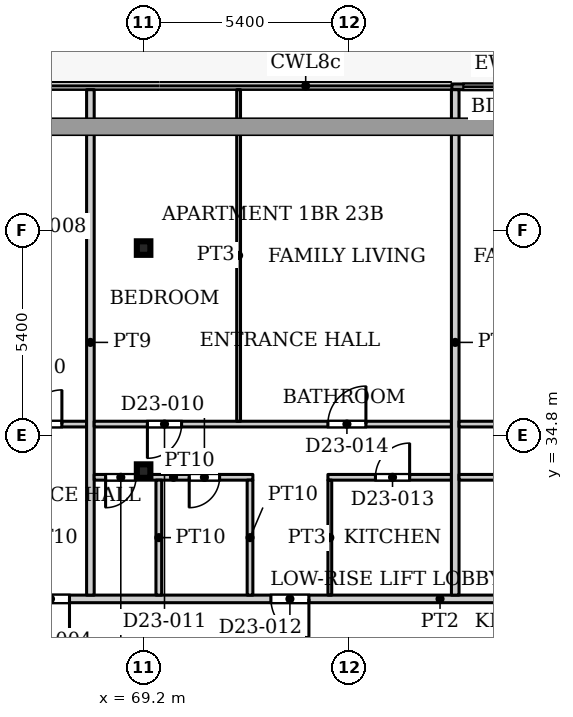
"""IFC4 building model, lengths in metres.
Left out: names, types, materials, properties, quantities, classifications, styles, units other than length and angle.
Written with IfcOpenShell. Run it as: python <this file> out.ifc"""

import sys

from ifc_helpers import new_model, si_unit, direction, frame, frame_2d, origin, origin_2d, place, context, subcontext, project, spatial, rectangle, hollow_rectangle, extrude, source, transform, mapped, element, fill, save


model = new_model("IFC4")
c1 = context("Model", 3, precision=1e-05, world=origin(), true_north=direction((0.0, 1.0)))
c2 = subcontext(c1, "Body", "Model", "MODEL_VIEW")
j1 = project(units=[si_unit("LENGTHUNIT", "METRE"), si_unit("PLANEANGLEUNIT", "RADIAN")], contexts=[c1])
p1 = place(None, origin())
s1 = spatial("IfcSite", under=j1, at=p1, CompositionType="ELEMENT")
p2 = place(p1, origin())
s2 = spatial("IfcBuilding", under=s1, at=p2, CompositionType="ELEMENT")
p3 = place(p2, frame((0.0, 0.0, 101.9)))
s3 = spatial("IfcBuildingStorey", under=s2, at=p3, CompositionType="ELEMENT", Elevation=101.9)
for number, where, z_axis, x_axis in (
    (1, (69.2, 33.863, 0.0), (0.0, 0.0, 1.0), (1.0, 0.0, 0.0)),
    (2, (69.2, 39.732, 0.0), (0.0, 0.0, 1.0), (1.0, 0.0, 0.0)),
):
    element("IfcColumn", number, at=place(p3, frame(where, z_axis=z_axis, x_axis=x_axis)), inside=s3, PredefinedType="COLUMN", context=c2, shape_type="SweptSolid", body=[
        extrude(hollow_rectangle(XDim=0.356, YDim=0.356, WallThickness=0.016, InnerFilletRadius=0.016, OuterFilletRadius=0.032, at=origin_2d()), origin(), (0.0, 0.0, 1.0), 3.9),
    ])
p4 = place(p3, frame((77.312, 43.975, 0.0), z_axis=(0.0, 0.0, 1.0), x_axis=(1.0, 0.0, 0.0)))
e3 = element("IfcWall", 3, at=p4, inside=s3, PredefinedType="SOLIDWALL", context=c2, shape_type="SweptSolid", body=[
    extrude(rectangle(XDim=2.4, YDim=0.15, at=frame_2d((1.2, 0.0))), origin(), (0.0, 0.0, 1.0), 3.75),
])
p5 = place(p4, frame((0.3, 0.0, 0.0)))
e4 = element("IfcOpeningElement", 4, at=p5, cuts=e3, PredefinedType="OPENING", context=c2, shape_type="SweptSolid", body=[
    extrude(rectangle(XDim=1.8, YDim=2.4, at=frame_2d((0.9, 1.2))), frame((0.0, 0.085, 0.0), z_axis=(0.0, -1.0, 0.0), x_axis=(1.0, 0.0, 0.0)), (0.0, 0.0, 1.0), 0.17),
])
p6 = place(p3, frame((55.9, 30.5, 0.0), z_axis=(0.0, 0.0, 1.0), x_axis=(1.0, 0.0, 0.0)))
e5 = element("IfcWall", 5, at=p6, inside=s3, PredefinedType="PARTITIONING", context=c2, shape_type="SweptSolid", body=[
    extrude(rectangle(XDim=42.2, YDim=0.2, at=frame_2d((21.1, 0.0))), origin(), (0.0, 0.0, 1.0), 3.6),
])
p7 = place(p6, frame((10.35, 0.0, 0.0)))
e6 = element("IfcOpeningElement", 6, at=p7, cuts=e5, PredefinedType="OPENING", context=c2, shape_type="SweptSolid", body=[
    extrude(rectangle(XDim=1.0, YDim=2.1, at=frame_2d((0.5, 1.05))), frame((0.0, 0.11, 0.0), z_axis=(0.0, -1.0, 0.0), x_axis=(1.0, 0.0, 0.0)), (0.0, 0.0, 1.0), 0.22),
])
p8 = place(p6, frame((16.65, 0.0, 0.0)))
e7 = element("IfcOpeningElement", 7, at=p8, cuts=e5, PredefinedType="OPENING", context=c2, shape_type="SweptSolid", body=[
    extrude(rectangle(XDim=1.0, YDim=2.1, at=frame_2d((0.5, 1.05))), frame((0.0, 0.11, 0.0), z_axis=(0.0, -1.0, 0.0), x_axis=(1.0, 0.0, 0.0)), (0.0, 0.0, 1.0), 0.22),
])
p9 = place(p6, frame((27.6, 0.0, 0.0)))
e8 = element("IfcOpeningElement", 8, at=p9, cuts=e5, PredefinedType="OPENING", context=c2, shape_type="SweptSolid", body=[
    extrude(rectangle(XDim=1.0, YDim=2.1, at=frame_2d((0.5, 1.05))), frame((0.0, 0.11, 0.0), z_axis=(0.0, -1.0, 0.0), x_axis=(1.0, 0.0, 0.0)), (0.0, 0.0, 1.0), 0.22),
])
p10 = place(p6, frame((36.0, 0.0, 0.0)))
e9 = element("IfcOpeningElement", 9, at=p10, cuts=e5, PredefinedType="OPENING", context=c2, shape_type="SweptSolid", body=[
    extrude(rectangle(XDim=1.0, YDim=2.1, at=frame_2d((0.5, 1.05))), frame((0.0, 0.11, 0.0), z_axis=(0.0, -1.0, 0.0), x_axis=(1.0, 0.0, 0.0)), (0.0, 0.0, 1.0), 0.22),
])
p11 = place(p3, frame((55.9, 35.1, 0.0), z_axis=(0.0, 0.0, 1.0), x_axis=(1.0, 0.0, 0.0)))
e10 = element("IfcWall", 10, at=p11, inside=s3, PredefinedType="PARTITIONING", context=c2, shape_type="SweptSolid", body=[
    extrude(rectangle(XDim=11.8, YDim=0.15, at=frame_2d((5.9, 0.0))), origin(), (0.0, 0.0, 1.0), 3.6),
])
p12 = place(p11, frame((0.8, 0.0, 0.0)))
e11 = element("IfcOpeningElement", 11, at=p12, cuts=e10, PredefinedType="OPENING", context=c2, shape_type="SweptSolid", body=[
    extrude(rectangle(XDim=0.9, YDim=2.1, at=frame_2d((0.45, 1.05))), frame((0.0, 0.085, 0.0), z_axis=(0.0, -1.0, 0.0), x_axis=(1.0, 0.0, 0.0)), (0.0, 0.0, 1.0), 0.17),
])
p13 = place(p11, frame((4.5, 0.0, 0.0)))
e12 = element("IfcOpeningElement", 12, at=p13, cuts=e10, PredefinedType="OPENING", context=c2, shape_type="SweptSolid", body=[
    extrude(rectangle(XDim=1.0, YDim=2.1, at=frame_2d((0.5, 1.05))), frame((0.0, 0.085, 0.0), z_axis=(0.0, -1.0, 0.0), x_axis=(1.0, 0.0, 0.0)), (0.0, 0.0, 1.0), 0.17),
])
p14 = place(p11, frame((10.25, 0.0, 0.0)))
e13 = element("IfcOpeningElement", 13, at=p14, cuts=e10, PredefinedType="OPENING", context=c2, shape_type="SweptSolid", body=[
    extrude(rectangle(XDim=0.9, YDim=2.1, at=frame_2d((0.45, 1.05))), frame((0.0, 0.085, 0.0), z_axis=(0.0, -1.0, 0.0), x_axis=(1.0, 0.0, 0.0)), (0.0, 0.0, 1.0), 0.17),
])
p15 = place(p3, frame((67.8, 30.6, 0.0), z_axis=(0.0, 0.0, 1.0), x_axis=(0.0, 1.0, 0.0)))
e14 = element("IfcWall", 14, at=p15, inside=s3, PredefinedType="PARTITIONING", context=c2, shape_type="SweptSolid", body=[
    extrude(rectangle(XDim=13.3, YDim=0.2, at=frame_2d((6.65, 0.0))), origin(), (0.0, 0.0, 1.0), 3.6),
])
p16 = place(p3, frame((67.9, 33.7, 0.0), z_axis=(0.0, 0.0, 1.0), x_axis=(1.0, 0.0, 0.0)))
e15 = element("IfcWall", 15, at=p16, inside=s3, PredefinedType="PARTITIONING", context=c2, shape_type="SweptSolid", body=[
    extrude(rectangle(XDim=4.175, YDim=0.15, at=frame_2d((2.087, 0.0))), origin(), (0.0, 0.0, 1.0), 3.6),
])
p17 = place(p16, frame((2.5, 0.0, 0.0)))
e16 = element("IfcOpeningElement", 16, at=p17, cuts=e15, PredefinedType="OPENING", context=c2, shape_type="SweptSolid", body=[
    extrude(rectangle(XDim=0.8, YDim=2.1, at=frame_2d((0.4, 1.05))), frame((0.0, 0.085, 0.0), z_axis=(0.0, -1.0, 0.0), x_axis=(1.0, 0.0, 0.0)), (0.0, 0.0, 1.0), 0.17),
])
p18 = place(p16, frame((0.3, 0.0, 0.0)))
e17 = element("IfcOpeningElement", 17, at=p18, cuts=e15, PredefinedType="OPENING", context=c2, shape_type="SweptSolid", body=[
    extrude(rectangle(XDim=0.8, YDim=2.1, at=frame_2d((0.4, 1.05))), frame((0.0, 0.085, 0.0), z_axis=(0.0, -1.0, 0.0), x_axis=(1.0, 0.0, 0.0)), (0.0, 0.0, 1.0), 0.17),
])
p19 = place(p3, frame((67.9, 35.1, 0.0), z_axis=(0.0, 0.0, 1.0), x_axis=(1.0, 0.0, 0.0)))
e18 = element("IfcWall", 18, at=p19, inside=s3, PredefinedType="PARTITIONING", context=c2, shape_type="SweptSolid", body=[
    extrude(rectangle(XDim=9.4, YDim=0.15, at=frame_2d((4.7, 0.0))), origin(), (0.0, 0.0, 1.0), 3.6),
])
p20 = place(p19, frame((1.4, 0.0, 0.0)))
e19 = element("IfcOpeningElement", 19, at=p20, cuts=e18, PredefinedType="OPENING", context=c2, shape_type="SweptSolid", body=[
    extrude(rectangle(XDim=0.9, YDim=2.1, at=frame_2d((0.45, 1.05))), frame((0.0, 0.085, 0.0), z_axis=(0.0, -1.0, 0.0), x_axis=(1.0, 0.0, 0.0)), (0.0, 0.0, 1.0), 0.17),
])
p21 = place(p19, frame((6.15, 0.0, 0.0)))
e20 = element("IfcOpeningElement", 20, at=p21, cuts=e18, PredefinedType="OPENING", context=c2, shape_type="SweptSolid", body=[
    extrude(rectangle(XDim=1.0, YDim=2.1, at=frame_2d((0.5, 1.05))), frame((0.0, 0.085, 0.0), z_axis=(0.0, -1.0, 0.0), x_axis=(1.0, 0.0, 0.0)), (0.0, 0.0, 1.0), 0.17),
])
p22 = place(p3, frame((69.6, 30.6, 0.0), z_axis=(0.0, 0.0, 1.0), x_axis=(0.0, 1.0, 0.0)))
e21 = element("IfcWall", 21, at=p22, inside=s3, PredefinedType="PARTITIONING", context=c2, shape_type="SweptSolid", body=[
    extrude(rectangle(XDim=3.025, YDim=0.15, at=frame_2d((1.512, 0.0))), origin(), (0.0, 0.0, 1.0), 3.6),
])
p23 = place(p3, frame((71.7, 35.175, 0.0), z_axis=(0.0, 0.0, 1.0), x_axis=(0.0, 1.0, 0.0)))
e22 = element("IfcWall", 22, at=p23, inside=s3, PredefinedType="PARTITIONING", context=c2, shape_type="SweptSolid", body=[
    extrude(rectangle(XDim=8.725, YDim=0.1, at=frame_2d((4.362, 0.0))), origin(), (0.0, 0.0, 1.0), 3.6),
])
p24 = place(p3, frame((72.0, 30.6, 0.0), z_axis=(0.0, 0.0, 1.0), x_axis=(0.0, 1.0, 0.0)))
e23 = element("IfcWall", 23, at=p24, inside=s3, PredefinedType="PARTITIONING", context=c2, shape_type="SweptSolid", body=[
    extrude(rectangle(XDim=3.025, YDim=0.15, at=frame_2d((1.512, 0.0))), origin(), (0.0, 0.0, 1.0), 3.6),
])
p25 = place(p3, frame((74.05, 33.7, 0.0), z_axis=(0.0, 0.0, 1.0), x_axis=(1.0, 0.0, 0.0)))
e24 = element("IfcWall", 24, at=p25, inside=s3, PredefinedType="PARTITIONING", context=c2, shape_type="SweptSolid", body=[
    extrude(rectangle(XDim=3.25, YDim=0.15, at=frame_2d((1.625, 0.0))), origin(), (0.0, 0.0, 1.0), 3.6),
])
p26 = place(p25, frame((1.25, 0.0, 0.0)))
e25 = element("IfcOpeningElement", 25, at=p26, cuts=e24, PredefinedType="OPENING", context=c2, shape_type="SweptSolid", body=[
    extrude(rectangle(XDim=0.9, YDim=2.1, at=frame_2d((0.45, 1.05))), frame((0.0, 0.085, 0.0), z_axis=(0.0, -1.0, 0.0), x_axis=(1.0, 0.0, 0.0)), (0.0, 0.0, 1.0), 0.17),
])
p27 = place(p3, frame((74.1, 30.6, 0.0), z_axis=(0.0, 0.0, 1.0), x_axis=(0.0, 1.0, 0.0)))
e26 = element("IfcWall", 26, at=p27, inside=s3, PredefinedType="PARTITIONING", context=c2, shape_type="SweptSolid", body=[
    extrude(rectangle(XDim=3.025, YDim=0.1, at=frame_2d((1.512, 0.0))), origin(), (0.0, 0.0, 1.0), 3.6),
])
p28 = place(p3, frame((77.4, 30.6, 0.0), z_axis=(0.0, 0.0, 1.0), x_axis=(0.0, 1.0, 0.0)))
e27 = element("IfcWall", 27, at=p28, inside=s3, PredefinedType="PARTITIONING", context=c2, shape_type="SweptSolid", body=[
    extrude(rectangle(XDim=13.3, YDim=0.2, at=frame_2d((6.65, 0.0))), origin(), (0.0, 0.0, 1.0), 3.6),
])
p29 = place(p3, frame((77.5, 33.7, 0.0), z_axis=(0.0, 0.0, 1.0), x_axis=(1.0, 0.0, 0.0)))
e28 = element("IfcWall", 28, at=p29, inside=s3, PredefinedType="PARTITIONING", context=c2, shape_type="SweptSolid", body=[
    extrude(rectangle(XDim=5.375, YDim=0.15, at=frame_2d((2.688, 0.0))), origin(), (0.0, 0.0, 1.0), 3.6),
])
p30 = place(p29, frame((1.25, 0.0, 0.0)))
e29 = element("IfcOpeningElement", 29, at=p30, cuts=e28, PredefinedType="OPENING", context=c2, shape_type="SweptSolid", body=[
    extrude(rectangle(XDim=0.9, YDim=2.1, at=frame_2d((0.45, 1.05))), frame((0.0, 0.085, 0.0), z_axis=(0.0, -1.0, 0.0), x_axis=(1.0, 0.0, 0.0)), (0.0, 0.0, 1.0), 0.17),
])
p31 = place(p29, frame((4.0, 0.0, 0.0)))
e30 = element("IfcOpeningElement", 30, at=p31, cuts=e28, PredefinedType="OPENING", context=c2, shape_type="SweptSolid", body=[
    extrude(rectangle(XDim=0.8, YDim=2.1, at=frame_2d((0.4, 1.05))), frame((0.0, 0.085, 0.0), z_axis=(0.0, -1.0, 0.0), x_axis=(1.0, 0.0, 0.0)), (0.0, 0.0, 1.0), 0.17),
])
p32 = place(p3, frame((77.5, 35.1, 0.0), z_axis=(0.0, 0.0, 1.0), x_axis=(1.0, 0.0, 0.0)))
e31 = element("IfcWall", 31, at=p32, inside=s3, PredefinedType="PARTITIONING", context=c2, shape_type="SweptSolid", body=[
    extrude(rectangle(XDim=10.0, YDim=0.15, at=frame_2d((5.0, 0.0))), origin(), (0.0, 0.0, 1.0), 3.6),
])
p33 = place(p32, frame((7.9, 0.0, 0.0)))
e32 = element("IfcOpeningElement", 32, at=p33, cuts=e31, PredefinedType="OPENING", context=c2, shape_type="SweptSolid", body=[
    extrude(rectangle(XDim=0.9, YDim=2.1, at=frame_2d((0.45, 1.05))), frame((0.0, 0.085, 0.0), z_axis=(0.0, -1.0, 0.0), x_axis=(1.0, 0.0, 0.0)), (0.0, 0.0, 1.0), 0.17),
])
p34 = place(p32, frame((2.55, 0.0, 0.0)))
e33 = element("IfcOpeningElement", 33, at=p34, cuts=e31, PredefinedType="OPENING", context=c2, shape_type="SweptSolid", body=[
    extrude(rectangle(XDim=1.0, YDim=2.1, at=frame_2d((0.5, 1.05))), frame((0.0, 0.085, 0.0), z_axis=(0.0, -1.0, 0.0), x_axis=(1.0, 0.0, 0.0)), (0.0, 0.0, 1.0), 0.17),
])
m1 = source(origin(), c2, "Body", "SweptSolid", [
    extrude(rectangle(XDim=1.8, YDim=2.4, at=frame_2d((0.9, 1.2))), frame((0.0, 0.025, 0.0), z_axis=(0.0, -1.0, 0.0), x_axis=(1.0, 0.0, 0.0)), (0.0, 0.0, 1.0), 0.05),
])
p35 = place(p5, origin())
e34 = element("IfcDoor", 34, at=p35, inside=s3, OperationType="SLIDING_TO_LEFT", PredefinedType="DOOR", context=c2, shape_type="MappedRepresentation", body=[
    mapped(m1, transform((0.0, 0.0, 0.0), x_axis=(1.0, 0.0, 0.0), y_axis=(0.0, 1.0, 0.0), z_axis=(0.0, 0.0, 1.0), scale=1.0)),
])
fill(e4, e34)
m2 = source(origin(), c2, "Body", "SweptSolid", [
    extrude(rectangle(XDim=1.0, YDim=2.1, at=frame_2d((0.5, 1.05))), frame((0.0, 0.025, 0.0), z_axis=(0.0, -1.0, 0.0), x_axis=(1.0, 0.0, 0.0)), (0.0, 0.0, 1.0), 0.05),
])
p36 = place(p7, origin())
e35 = element("IfcDoor", 35, at=p36, inside=s3, OperationType="SINGLE_SWING_RIGHT", PredefinedType="DOOR", context=c2, shape_type="MappedRepresentation", body=[
    mapped(m2, transform((0.0, 0.0, 0.0), x_axis=(1.0, 0.0, 0.0), y_axis=(0.0, 1.0, 0.0), z_axis=(0.0, 0.0, 1.0), scale=1.0)),
])
fill(e6, e35)
m3 = source(origin(), c2, "Body", "SweptSolid", [
    extrude(rectangle(XDim=0.9, YDim=2.1, at=frame_2d((0.45, 1.05))), frame((0.0, 0.025, 0.0), z_axis=(0.0, -1.0, 0.0), x_axis=(1.0, 0.0, 0.0)), (0.0, 0.0, 1.0), 0.05),
])
p37 = place(p14, origin())
e36 = element("IfcDoor", 36, at=p37, inside=s3, OperationType="SINGLE_SWING_LEFT", PredefinedType="DOOR", context=c2, shape_type="MappedRepresentation", body=[
    mapped(m3, transform((0.0, 0.0, 0.0), x_axis=(1.0, 0.0, 0.0), y_axis=(0.0, 1.0, 0.0), z_axis=(0.0, 0.0, 1.0), scale=1.0)),
])
fill(e13, e36)
m4 = source(origin(), c2, "Body", "SweptSolid", [
    extrude(rectangle(XDim=0.8, YDim=2.1, at=frame_2d((0.4, 1.05))), frame((0.0, 0.025, 0.0), z_axis=(0.0, -1.0, 0.0), x_axis=(1.0, 0.0, 0.0)), (0.0, 0.0, 1.0), 0.05),
])
p38 = place(p17, origin())
e37 = element("IfcDoor", 37, at=p38, inside=s3, OperationType="SINGLE_SWING_RIGHT", PredefinedType="DOOR", context=c2, shape_type="MappedRepresentation", body=[
    mapped(m4, transform((0.0, 0.0, 0.0), x_axis=(1.0, 0.0, 0.0), y_axis=(0.0, 1.0, 0.0), z_axis=(0.0, 0.0, 1.0), scale=1.0)),
])
fill(e16, e37)
p39 = place(p20, origin())
e38 = element("IfcDoor", 38, at=p39, inside=s3, OperationType="SINGLE_SWING_RIGHT", PredefinedType="DOOR", context=c2, shape_type="MappedRepresentation", body=[
    mapped(m3, transform((0.0, 0.0, 0.0), x_axis=(1.0, 0.0, 0.0), y_axis=(0.0, 1.0, 0.0), z_axis=(0.0, 0.0, 1.0), scale=1.0)),
])
fill(e19, e38)
p40 = place(p8, origin())
e39 = element("IfcDoor", 39, at=p40, inside=s3, OperationType="SINGLE_SWING_RIGHT", PredefinedType="DOOR", context=c2, shape_type="MappedRepresentation", body=[
    mapped(m2, transform((0.0, 0.0, 0.0), x_axis=(1.0, 0.0, 0.0), y_axis=(0.0, 1.0, 0.0), z_axis=(0.0, 0.0, 1.0), scale=1.0)),
])
fill(e7, e39)
p41 = place(p26, origin())
e40 = element("IfcDoor", 40, at=p41, inside=s3, OperationType="SINGLE_SWING_LEFT", PredefinedType="DOOR", context=c2, shape_type="MappedRepresentation", body=[
    mapped(m3, transform((0.0, 0.0, 0.0), x_axis=(1.0, 0.0, 0.0), y_axis=(0.0, 1.0, 0.0), z_axis=(0.0, 0.0, 1.0), scale=1.0)),
])
fill(e25, e40)
m5 = source(origin(), c2, "Body", "SweptSolid", [
    extrude(rectangle(XDim=1.0, YDim=2.1, at=frame_2d((0.5, 1.05))), frame((0.0, 0.025, 0.0), z_axis=(0.0, -1.0, 0.0), x_axis=(1.0, 0.0, 0.0)), (0.0, 0.0, 1.0), 0.05),
])
p42 = place(p21, origin())
e41 = element("IfcDoor", 41, at=p42, inside=s3, OperationType="SINGLE_SWING_LEFT", PredefinedType="DOOR", context=c2, shape_type="MappedRepresentation", body=[
    mapped(m5, transform((0.0, 0.0, 0.0), x_axis=(1.0, 0.0, 0.0), y_axis=(0.0, 1.0, 0.0), z_axis=(0.0, 0.0, 1.0), scale=1.0)),
])
fill(e20, e41)
p43 = place(p18, origin())
e42 = element("IfcDoor", 42, at=p43, inside=s3, OperationType="SINGLE_SWING_RIGHT", PredefinedType="DOOR", context=c2, shape_type="MappedRepresentation", body=[
    mapped(m4, transform((0.0, 0.0, 0.0), x_axis=(1.0, 0.0, 0.0), y_axis=(0.0, 1.0, 0.0), z_axis=(0.0, 0.0, 1.0), scale=1.0)),
])
fill(e17, e42)
save(model, sys.argv[1])
